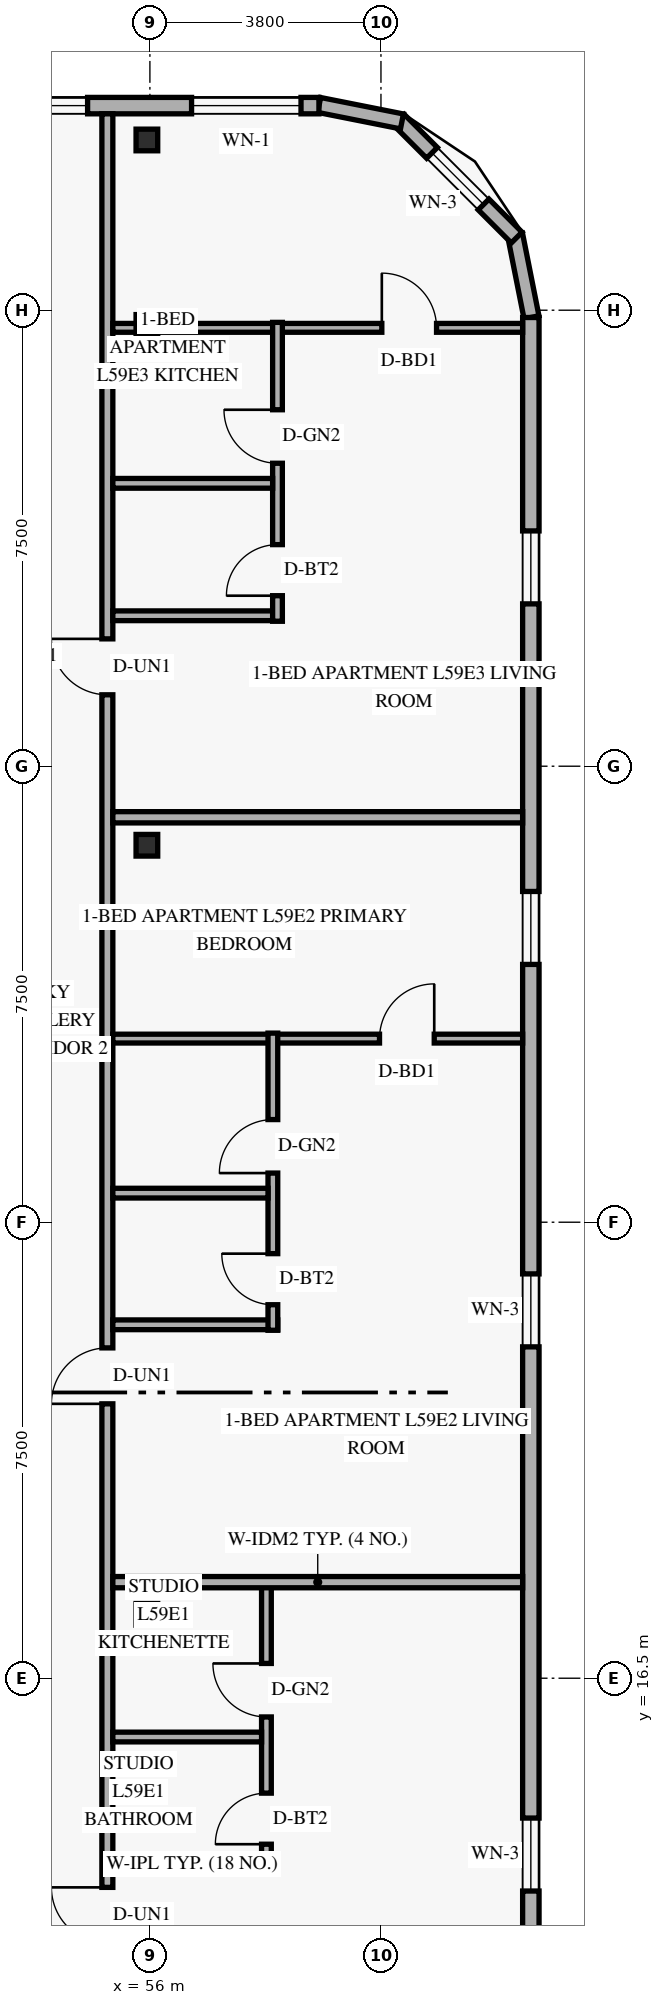
"""IFC4 building model, lengths in metres.
Left out: names, types, materials, properties, quantities, classifications, styles, units other than length and angle.
Written with IfcOpenShell. Run it as: python <this file> out.ifc"""

import sys

from ifc_helpers import new_model, si_unit, direction, frame, frame_2d, origin, origin_2d, place, context, subcontext, project, spatial, rectangle, hollow_rectangle, extrude, element, fill, save


model = new_model("IFC4")
c1 = context("Model", 3, precision=1e-05, world=origin(), true_north=direction((0.0, 1.0)))
c2 = subcontext(c1, "Body", "Model", "MODEL_VIEW")
j1 = project(units=[si_unit("LENGTHUNIT", "METRE"), si_unit("PLANEANGLEUNIT", "RADIAN")], contexts=[c1])
p1 = place(None, origin())
s1 = spatial("IfcSite", under=j1, at=p1, CompositionType="ELEMENT")
p2 = place(p1, origin())
s2 = spatial("IfcBuilding", under=s1, at=p2, CompositionType="ELEMENT")
p3 = place(p2, frame((0.0, 0.0, 227.4)))
s3 = spatial("IfcBuildingStorey", under=s2, at=p3, CompositionType="ELEMENT", Elevation=227.4)
for number, where, z_axis, x_axis in (
    (1, (55.846, 17.55, 0.0), (0.058, 0.0, 0.998), (0.0, 1.0, 0.0)),
    (2, (55.846, 30.2, 0.0), (0.058, 0.0, 0.998), (0.0, 1.0, 0.0)),
    (3, (55.846, 38.75, 0.0), (0.058, 0.0, 0.998), (0.0, 1.0, 0.0)),
    (4, (55.846, 41.8, 0.0), (0.058, 0.0, 0.998), (0.0, 1.0, 0.0)),
):
    element("IfcColumn", number, at=place(p3, frame(where, z_axis=z_axis, x_axis=x_axis)), inside=s3, PredefinedType="COLUMN", context=c2, shape_type="SweptSolid", body=[
        extrude(hollow_rectangle(XDim=0.356, YDim=0.356, WallThickness=0.016, at=origin_2d()), origin(), (0.0, 0.0, 1.0), 3.606),
    ])
p4 = place(p3, frame((62.276, 38.884, 0.0), z_axis=(0.0, 0.0, 1.0), x_axis=(-0.195135625965, 0.9807762678, 0.0)))
e5 = element("IfcWall", 5, at=p4, inside=s3, PredefinedType="SOLIDWALL", context=c2, shape_type="SweptSolid", body=[
    extrude(rectangle(XDim=1.389, YDim=0.25, at=frame_2d((0.694, 0.0))), origin(), (0.0, 0.0, 1.0), 3.35),
])
p5 = place(p3, frame((62.032, 40.195, 0.0), z_axis=(0.0, 0.0, 1.0), x_axis=(-0.707106781187, 0.707106781187, 0.0)))
e6 = element("IfcWall", 6, at=p5, inside=s3, PredefinedType="SOLIDWALL", context=c2, shape_type="SweptSolid", body=[
    extrude(rectangle(XDim=2.739, YDim=0.25, at=frame_2d((1.37, 0.0))), origin(), (0.0, 0.0, 1.0), 3.35),
])
p6 = place(p5, frame((0.77, 0.0, 0.85)))
e7 = element("IfcOpeningElement", 7, at=p6, cuts=e6, PredefinedType="OPENING", context=c2, shape_type="SweptSolid", body=[
    extrude(rectangle(XDim=1.2, YDim=1.5, at=frame_2d((0.6, 0.75))), frame((0.0, 0.135, 0.0), z_axis=(0.0, -1.0, 0.0), x_axis=(1.0, 0.0, 0.0)), (0.0, 0.0, 1.0), 0.27),
])
p7 = place(p3, frame((60.146, 42.105, 0.0), z_axis=(0.0, 0.0, 1.0), x_axis=(-0.980809899341, 0.19496651342, 0.0)))
e8 = element("IfcWall", 8, at=p7, inside=s3, PredefinedType="SOLIDWALL", context=c2, shape_type="SweptSolid", body=[
    extrude(rectangle(XDim=1.389, YDim=0.25, at=frame_2d((0.694, 0.0))), origin(), (0.0, 0.0, 1.0), 3.35),
])
p8 = place(p3, frame((62.265, 9.12, 0.0), z_axis=(0.0, 0.0, 1.0), x_axis=(0.0, 1.0, 0.0)))
e9 = element("IfcWall", 9, at=p8, inside=s3, PredefinedType="SOLIDWALL", context=c2, shape_type="SweptSolid", body=[
    extrude(rectangle(XDim=29.76, YDim=0.27, at=frame_2d((14.88, 0.0))), origin(), (0.0, 0.0, 1.0), 3.35),
])
p9 = place(p8, frame((3.88, 0.0, 0.85)))
e10 = element("IfcOpeningElement", 10, at=p9, cuts=e9, PredefinedType="OPENING", context=c2, shape_type="SweptSolid", body=[
    extrude(rectangle(XDim=1.2, YDim=1.5, at=frame_2d((0.6, 0.75))), frame((0.0, 0.145, 0.0), z_axis=(0.0, -1.0, 0.0), x_axis=(1.0, 0.0, 0.0)), (0.0, 0.0, 1.0), 0.29),
])
p10 = place(p8, frame((12.83, 0.0, 0.85)))
e11 = element("IfcOpeningElement", 11, at=p10, cuts=e9, PredefinedType="OPENING", context=c2, shape_type="SweptSolid", body=[
    extrude(rectangle(XDim=1.2, YDim=1.5, at=frame_2d((0.6, 0.75))), frame((0.0, 0.145, 0.0), z_axis=(0.0, -1.0, 0.0), x_axis=(1.0, 0.0, 0.0)), (0.0, 0.0, 1.0), 0.29),
])
p11 = place(p8, frame((19.12, 0.0, 0.85)))
e12 = element("IfcOpeningElement", 12, at=p11, cuts=e9, PredefinedType="OPENING", context=c2, shape_type="SweptSolid", body=[
    extrude(rectangle(XDim=1.2, YDim=1.5, at=frame_2d((0.6, 0.75))), frame((0.0, 0.145, 0.0), z_axis=(0.0, -1.0, 0.0), x_axis=(1.0, 0.0, 0.0)), (0.0, 0.0, 1.0), 0.29),
])
p12 = place(p8, frame((25.05, 0.0, 0.85)))
e13 = element("IfcOpeningElement", 13, at=p12, cuts=e9, PredefinedType="OPENING", context=c2, shape_type="SweptSolid", body=[
    extrude(rectangle(XDim=1.2, YDim=1.5, at=frame_2d((0.6, 0.75))), frame((0.0, 0.145, 0.0), z_axis=(0.0, -1.0, 0.0), x_axis=(1.0, 0.0, 0.0)), (0.0, 0.0, 1.0), 0.29),
])
p13 = place(p3, frame((58.78, 42.365, 0.0), z_axis=(0.0, 0.0, 1.0), x_axis=(-1.0, 0.0, 0.0)))
e14 = element("IfcWall", 14, at=p13, inside=s3, PredefinedType="SOLIDWALL", context=c2, shape_type="SweptSolid", body=[
    extrude(rectangle(XDim=32.96, YDim=0.27, at=frame_2d((16.48, 0.0))), origin(), (0.0, 0.0, 1.0), 3.35),
])
p14 = place(p13, frame((27.59, 0.0, 0.85)))
e15 = element("IfcOpeningElement", 15, at=p14, cuts=e14, PredefinedType="OPENING", context=c2, shape_type="SweptSolid", body=[
    extrude(rectangle(XDim=1.8, YDim=1.6, at=frame_2d((0.9, 0.8))), frame((0.0, 0.145, 0.0), z_axis=(0.0, -1.0, 0.0), x_axis=(1.0, 0.0, 0.0)), (0.0, 0.0, 1.0), 0.29),
])
p15 = place(p13, frame((14.671, 0.0, 0.85)))
e16 = element("IfcOpeningElement", 16, at=p15, cuts=e14, PredefinedType="OPENING", context=c2, shape_type="SweptSolid", body=[
    extrude(rectangle(XDim=1.8, YDim=1.6, at=frame_2d((0.9, 0.8))), frame((0.0, 0.145, 0.0), z_axis=(0.0, -1.0, 0.0), x_axis=(1.0, 0.0, 0.0)), (0.0, 0.0, 1.0), 0.29),
])
p16 = place(p13, frame((3.805, 0.0, 0.85)))
e17 = element("IfcOpeningElement", 17, at=p16, cuts=e14, PredefinedType="OPENING", context=c2, shape_type="SweptSolid", body=[
    extrude(rectangle(XDim=1.2, YDim=1.5, at=frame_2d((0.6, 0.75))), frame((0.0, 0.145, 0.0), z_axis=(0.0, -1.0, 0.0), x_axis=(1.0, 0.0, 0.0)), (0.0, 0.0, 1.0), 0.29),
])
p17 = place(p13, frame((0.295, 0.0, 0.85)))
e18 = element("IfcOpeningElement", 18, at=p17, cuts=e14, PredefinedType="OPENING", context=c2, shape_type="SweptSolid", body=[
    extrude(rectangle(XDim=1.8, YDim=1.6, at=frame_2d((0.9, 0.8))), frame((0.0, 0.145, 0.0), z_axis=(0.0, -1.0, 0.0), x_axis=(1.0, 0.0, 0.0)), (0.0, 0.0, 1.0), 0.29),
])
p18 = place(p3, frame((55.3, 5.77, 0.0), z_axis=(0.0, 0.0, 1.0), x_axis=(0.0, 1.0, 0.0)))
e19 = element("IfcWall", 19, at=p18, inside=s3, PredefinedType="STANDARD", context=c2, shape_type="SweptSolid", body=[
    extrude(rectangle(XDim=36.46, YDim=0.18, at=frame_2d((18.23, 0.0))), origin(), (0.0, 0.0, 1.0), 2.793),
])
p19 = place(p18, frame((6.37, 0.0, 0.0)))
e20 = element("IfcOpeningElement", 20, at=p19, cuts=e19, PredefinedType="OPENING", context=c2, shape_type="SweptSolid", body=[
    extrude(rectangle(XDim=0.92, YDim=2.15, at=frame_2d((0.46, 1.075))), frame((0.0, 0.1, 0.0), z_axis=(0.0, -1.0, 0.0), x_axis=(1.0, 0.0, 0.0)), (0.0, 0.0, 1.0), 0.2),
])
p20 = place(p18, frame((15.243, 0.0, 0.0)))
e21 = element("IfcOpeningElement", 21, at=p20, cuts=e19, PredefinedType="OPENING", context=c2, shape_type="SweptSolid", body=[
    extrude(rectangle(XDim=0.92, YDim=2.15, at=frame_2d((0.46, 1.075))), frame((0.0, 0.1, 0.0), z_axis=(0.0, -1.0, 0.0), x_axis=(1.0, 0.0, 0.0)), (0.0, 0.0, 1.0), 0.2),
])
p21 = place(p18, frame((26.905, 0.0, 0.0)))
e22 = element("IfcOpeningElement", 22, at=p21, cuts=e19, PredefinedType="OPENING", context=c2, shape_type="SweptSolid", body=[
    extrude(rectangle(XDim=0.92, YDim=2.15, at=frame_2d((0.46, 1.075))), frame((0.0, 0.1, 0.0), z_axis=(0.0, -1.0, 0.0), x_axis=(1.0, 0.0, 0.0)), (0.0, 0.0, 1.0), 0.2),
])
p22 = place(p3, frame((55.39, 13.44, 0.0), z_axis=(0.0, 0.0, 1.0), x_axis=(1.0, 0.0, 0.0)))
e23 = element("IfcWall", 23, at=p22, inside=s3, PredefinedType="PLUMBINGWALL", context=c2, shape_type="SweptSolid", body=[
    extrude(rectangle(XDim=2.606, YDim=0.16, at=frame_2d((1.303, 0.0))), origin(), (0.0, 0.0, 1.0), 2.793),
])
p23 = place(p3, frame((57.917, 13.35, 0.0), z_axis=(0.0, 0.0, 1.0), x_axis=(0.0, 1.0, 0.0)))
e24 = element("IfcWall", 24, at=p23, inside=s3, PredefinedType="PLUMBINGWALL", context=c2, shape_type="SweptSolid", body=[
    extrude(rectangle(XDim=4.73, YDim=0.16, at=frame_2d((2.365, 0.0))), origin(), (0.0, 0.0, 1.0), 3.35),
])
p24 = place(p23, frame((0.42, 0.0, 0.0)))
e25 = element("IfcOpeningElement", 25, at=p24, cuts=e24, PredefinedType="OPENING", context=c2, shape_type="SweptSolid", body=[
    extrude(rectangle(XDim=0.84, YDim=2.12, at=frame_2d((0.42, 1.06))), frame((0.0, 0.09, 0.0), z_axis=(0.0, -1.0, 0.0), x_axis=(1.0, 0.0, 0.0)), (0.0, 0.0, 1.0), 0.18),
])
p25 = place(p23, frame((2.513, 0.0, 0.0)))
e26 = element("IfcOpeningElement", 26, at=p25, cuts=e24, PredefinedType="OPENING", context=c2, shape_type="SweptSolid", body=[
    extrude(rectangle(XDim=0.88, YDim=2.12, at=frame_2d((0.44, 1.06))), frame((0.0, 0.09, 0.0), z_axis=(0.0, -1.0, 0.0), x_axis=(1.0, 0.0, 0.0)), (0.0, 0.0, 1.0), 0.18),
])
p26 = place(p3, frame((55.39, 15.533, 0.0), z_axis=(0.0, 0.0, 1.0), x_axis=(1.0, 0.0, 0.0)))
e27 = element("IfcWall", 27, at=p26, inside=s3, PredefinedType="PLUMBINGWALL", context=c2, shape_type="SweptSolid", body=[
    extrude(rectangle(XDim=2.446, YDim=0.16, at=frame_2d((1.223, 0.0))), origin(), (0.0, 0.0, 1.0), 2.793),
])
p27 = place(p3, frame((55.39, 18.08, 0.0), z_axis=(0.0, 0.0, 1.0), x_axis=(1.0, 0.0, 0.0)))
e28 = element("IfcWall", 28, at=p27, inside=s3, PredefinedType="PARTITIONING", context=c2, shape_type="SweptSolid", body=[
    extrude(rectangle(XDim=6.74, YDim=0.185, at=frame_2d((3.37, 0.0))), origin(), (0.0, 0.0, 1.0), 2.793),
])
p28 = place(p3, frame((55.39, 27.02, 0.0), z_axis=(0.0, 0.0, 1.0), x_axis=(1.0, 0.0, 0.0)))
e29 = element("IfcWall", 29, at=p28, inside=s3, PredefinedType="PARTITIONING", context=c2, shape_type="SweptSolid", body=[
    extrude(rectangle(XDim=6.74, YDim=0.145, at=frame_2d((3.37, 0.0))), origin(), (0.0, 0.0, 1.0), 2.793),
])
p29 = place(p28, frame((4.386, 0.0, 0.0)))
e30 = element("IfcOpeningElement", 30, at=p29, cuts=e29, PredefinedType="OPENING", context=c2, shape_type="SweptSolid", body=[
    extrude(rectangle(XDim=0.9, YDim=2.14, at=frame_2d((0.45, 1.07))), frame((0.0, 0.083, 0.0), z_axis=(0.0, -1.0, 0.0), x_axis=(1.0, 0.0, 0.0)), (0.0, 0.0, 1.0), 0.165),
])
p30 = place(p3, frame((55.39, 22.313, 0.0), z_axis=(0.0, 0.0, 1.0), x_axis=(1.0, 0.0, 0.0)))
e31 = element("IfcWall", 31, at=p30, inside=s3, PredefinedType="PLUMBINGWALL", context=c2, shape_type="SweptSolid", body=[
    extrude(rectangle(XDim=2.712, YDim=0.16, at=frame_2d((1.356, 0.0))), origin(), (0.0, 0.0, 1.0), 2.793),
])
p31 = place(p3, frame((58.022, 22.223, 0.0), z_axis=(0.0, 0.0, 1.0), x_axis=(0.0, 1.0, 0.0)))
e32 = element("IfcWall", 32, at=p31, inside=s3, PredefinedType="PLUMBINGWALL", context=c2, shape_type="SweptSolid", body=[
    extrude(rectangle(XDim=4.887, YDim=0.16, at=frame_2d((2.444, 0.0))), origin(), (0.0, 0.0, 1.0), 3.35),
])
p32 = place(p31, frame((0.42, 0.0, 0.0)))
e33 = element("IfcOpeningElement", 33, at=p32, cuts=e32, PredefinedType="OPENING", context=c2, shape_type="SweptSolid", body=[
    extrude(rectangle(XDim=0.84, YDim=2.12, at=frame_2d((0.42, 1.06))), frame((0.0, 0.09, 0.0), z_axis=(0.0, -1.0, 0.0), x_axis=(1.0, 0.0, 0.0)), (0.0, 0.0, 1.0), 0.18),
])
p33 = place(p31, frame((2.585, 0.0, 0.0)))
e34 = element("IfcOpeningElement", 34, at=p33, cuts=e32, PredefinedType="OPENING", context=c2, shape_type="SweptSolid", body=[
    extrude(rectangle(XDim=0.88, YDim=2.12, at=frame_2d((0.44, 1.06))), frame((0.0, 0.09, 0.0), z_axis=(0.0, -1.0, 0.0), x_axis=(1.0, 0.0, 0.0)), (0.0, 0.0, 1.0), 0.18),
])
p34 = place(p3, frame((55.39, 24.478, 0.0), z_axis=(0.0, 0.0, 1.0), x_axis=(1.0, 0.0, 0.0)))
e35 = element("IfcWall", 35, at=p34, inside=s3, PredefinedType="PLUMBINGWALL", context=c2, shape_type="SweptSolid", body=[
    extrude(rectangle(XDim=2.552, YDim=0.16, at=frame_2d((1.276, 0.0))), origin(), (0.0, 0.0, 1.0), 2.793),
])
p35 = place(p3, frame((55.39, 30.66, 0.0), z_axis=(0.0, 0.0, 1.0), x_axis=(1.0, 0.0, 0.0)))
e36 = element("IfcWall", 36, at=p35, inside=s3, PredefinedType="PARTITIONING", context=c2, shape_type="SweptSolid", body=[
    extrude(rectangle(XDim=6.74, YDim=0.185, at=frame_2d((3.37, 0.0))), origin(), (0.0, 0.0, 1.0), 2.793),
])
p36 = place(p3, frame((55.39, 38.71, 0.0), z_axis=(0.0, 0.0, 1.0), x_axis=(1.0, 0.0, 0.0)))
e37 = element("IfcWall", 37, at=p36, inside=s3, PredefinedType="PARTITIONING", context=c2, shape_type="SweptSolid", body=[
    extrude(rectangle(XDim=6.74, YDim=0.145, at=frame_2d((3.37, 0.0))), origin(), (0.0, 0.0, 1.0), 2.793),
])
p37 = place(p36, frame((4.424, 0.0, 0.0)))
e38 = element("IfcOpeningElement", 38, at=p37, cuts=e37, PredefinedType="OPENING", context=c2, shape_type="SweptSolid", body=[
    extrude(rectangle(XDim=0.9, YDim=2.14, at=frame_2d((0.45, 1.07))), frame((0.0, 0.083, 0.0), z_axis=(0.0, -1.0, 0.0), x_axis=(1.0, 0.0, 0.0)), (0.0, 0.0, 1.0), 0.165),
])
p38 = place(p3, frame((55.39, 33.975, 0.0), z_axis=(0.0, 0.0, 1.0), x_axis=(1.0, 0.0, 0.0)))
e39 = element("IfcWall", 39, at=p38, inside=s3, PredefinedType="PLUMBINGWALL", context=c2, shape_type="SweptSolid", body=[
    extrude(rectangle(XDim=2.788, YDim=0.16, at=frame_2d((1.394, 0.0))), origin(), (0.0, 0.0, 1.0), 2.793),
])
p39 = place(p3, frame((58.098, 33.885, 0.0), z_axis=(0.0, 0.0, 1.0), x_axis=(0.0, 1.0, 0.0)))
e40 = element("IfcWall", 40, at=p39, inside=s3, PredefinedType="PLUMBINGWALL", context=c2, shape_type="SweptSolid", body=[
    extrude(rectangle(XDim=4.916, YDim=0.16, at=frame_2d((2.458, 0.0))), origin(), (0.0, 0.0, 1.0), 3.35),
])
p40 = place(p39, frame((0.42, 0.0, 0.0)))
e41 = element("IfcOpeningElement", 41, at=p40, cuts=e40, PredefinedType="OPENING", context=c2, shape_type="SweptSolid", body=[
    extrude(rectangle(XDim=0.84, YDim=2.12, at=frame_2d((0.42, 1.06))), frame((0.0, 0.09, 0.0), z_axis=(0.0, -1.0, 0.0), x_axis=(1.0, 0.0, 0.0)), (0.0, 0.0, 1.0), 0.18),
])
p41 = place(p39, frame((2.598, 0.0, 0.0)))
e42 = element("IfcOpeningElement", 42, at=p41, cuts=e40, PredefinedType="OPENING", context=c2, shape_type="SweptSolid", body=[
    extrude(rectangle(XDim=0.88, YDim=2.12, at=frame_2d((0.44, 1.06))), frame((0.0, 0.09, 0.0), z_axis=(0.0, -1.0, 0.0), x_axis=(1.0, 0.0, 0.0)), (0.0, 0.0, 1.0), 0.18),
])
p42 = place(p3, frame((55.39, 36.153, 0.0), z_axis=(0.0, 0.0, 1.0), x_axis=(1.0, 0.0, 0.0)))
e43 = element("IfcWall", 43, at=p42, inside=s3, PredefinedType="PLUMBINGWALL", context=c2, shape_type="SweptSolid", body=[
    extrude(rectangle(XDim=2.628, YDim=0.16, at=frame_2d((1.314, 0.0))), origin(), (0.0, 0.0, 1.0), 2.793),
])
p43 = place(p6, origin())
e44 = element("IfcWindow", 44, at=p43, inside=s3, PartitioningType="SINGLE_PANEL", PredefinedType="WINDOW", context=c2, shape_type="SweptSolid", body=[
    extrude(rectangle(XDim=1.2, YDim=1.5, at=frame_2d((0.6, 0.75))), frame((0.0, 0.03, 0.0), z_axis=(0.0, -1.0, 0.0), x_axis=(1.0, 0.0, 0.0)), (0.0, 0.0, 1.0), 0.06),
])
fill(e7, e44)
p44 = place(p9, origin())
e45 = element("IfcWindow", 45, at=p44, inside=s3, PartitioningType="SINGLE_PANEL", PredefinedType="WINDOW", context=c2, shape_type="SweptSolid", body=[
    extrude(rectangle(XDim=1.2, YDim=1.5, at=frame_2d((0.6, 0.75))), frame((0.0, 0.03, 0.0), z_axis=(0.0, -1.0, 0.0), x_axis=(1.0, 0.0, 0.0)), (0.0, 0.0, 1.0), 0.06),
])
fill(e10, e45)
p45 = place(p10, origin())
e46 = element("IfcWindow", 46, at=p45, inside=s3, PartitioningType="SINGLE_PANEL", PredefinedType="WINDOW", context=c2, shape_type="SweptSolid", body=[
    extrude(rectangle(XDim=1.2, YDim=1.5, at=frame_2d((0.6, 0.75))), frame((0.0, 0.03, 0.0), z_axis=(0.0, -1.0, 0.0), x_axis=(1.0, 0.0, 0.0)), (0.0, 0.0, 1.0), 0.06),
])
fill(e11, e46)
p46 = place(p11, origin())
e47 = element("IfcWindow", 47, at=p46, inside=s3, PartitioningType="SINGLE_PANEL", PredefinedType="WINDOW", context=c2, shape_type="SweptSolid", body=[
    extrude(rectangle(XDim=1.2, YDim=1.5, at=frame_2d((0.6, 0.75))), frame((0.0, 0.03, 0.0), z_axis=(0.0, -1.0, 0.0), x_axis=(1.0, 0.0, 0.0)), (0.0, 0.0, 1.0), 0.06),
])
fill(e12, e47)
p47 = place(p12, origin())
e48 = element("IfcWindow", 48, at=p47, inside=s3, PartitioningType="SINGLE_PANEL", PredefinedType="WINDOW", context=c2, shape_type="SweptSolid", body=[
    extrude(rectangle(XDim=1.2, YDim=1.5, at=frame_2d((0.6, 0.75))), frame((0.0, 0.03, 0.0), z_axis=(0.0, -1.0, 0.0), x_axis=(1.0, 0.0, 0.0)), (0.0, 0.0, 1.0), 0.06),
])
fill(e13, e48)
p48 = place(p16, origin())
e49 = element("IfcWindow", 49, at=p48, inside=s3, PartitioningType="SINGLE_PANEL", PredefinedType="WINDOW", context=c2, shape_type="SweptSolid", body=[
    extrude(rectangle(XDim=1.2, YDim=1.5, at=frame_2d((0.6, 0.75))), frame((0.0, 0.03, 0.0), z_axis=(0.0, -1.0, 0.0), x_axis=(1.0, 0.0, 0.0)), (0.0, 0.0, 1.0), 0.06),
])
fill(e17, e49)
p49 = place(p17, origin())
e50 = element("IfcWindow", 50, at=p49, inside=s3, PartitioningType="SINGLE_PANEL", PredefinedType="WINDOW", context=c2, shape_type="SweptSolid", body=[
    extrude(rectangle(XDim=1.8, YDim=1.6, at=frame_2d((0.9, 0.8))), frame((0.0, 0.03, 0.0), z_axis=(0.0, -1.0, 0.0), x_axis=(1.0, 0.0, 0.0)), (0.0, 0.0, 1.0), 0.06),
])
fill(e18, e50)
p50 = place(p19, origin())
e51 = element("IfcDoor", 51, at=p50, inside=s3, OperationType="SINGLE_SWING_RIGHT", PredefinedType="DOOR", context=c2, shape_type="SweptSolid", body=[
    extrude(rectangle(XDim=0.92, YDim=2.15, at=frame_2d((0.46, 1.075))), frame((0.0, 0.025, 0.0), z_axis=(0.0, -1.0, 0.0), x_axis=(1.0, 0.0, 0.0)), (0.0, 0.0, 1.0), 0.05),
])
fill(e20, e51)
p51 = place(p24, origin())
e52 = element("IfcDoor", 52, at=p51, inside=s3, OperationType="SINGLE_SWING_LEFT", PredefinedType="DOOR", context=c2, shape_type="SweptSolid", body=[
    extrude(rectangle(XDim=0.84, YDim=2.12, at=frame_2d((0.42, 1.06))), frame((0.0, 0.025, 0.0), z_axis=(0.0, -1.0, 0.0), x_axis=(1.0, 0.0, 0.0)), (0.0, 0.0, 1.0), 0.05),
])
fill(e25, e52)
p52 = place(p25, origin())
e53 = element("IfcDoor", 53, at=p52, inside=s3, OperationType="SINGLE_SWING_RIGHT", PredefinedType="DOOR", context=c2, shape_type="SweptSolid", body=[
    extrude(rectangle(XDim=0.88, YDim=2.12, at=frame_2d((0.44, 1.06))), frame((0.0, 0.025, 0.0), z_axis=(0.0, -1.0, 0.0), x_axis=(1.0, 0.0, 0.0)), (0.0, 0.0, 1.0), 0.05),
])
fill(e26, e53)
p53 = place(p20, origin())
e54 = element("IfcDoor", 54, at=p53, inside=s3, OperationType="SINGLE_SWING_LEFT", PredefinedType="DOOR", context=c2, shape_type="SweptSolid", body=[
    extrude(rectangle(XDim=0.92, YDim=2.15, at=frame_2d((0.46, 1.075))), frame((0.0, 0.025, 0.0), z_axis=(0.0, -1.0, 0.0), x_axis=(1.0, 0.0, 0.0)), (0.0, 0.0, 1.0), 0.05),
])
fill(e21, e54)
p54 = place(p32, origin())
e55 = element("IfcDoor", 55, at=p54, inside=s3, OperationType="SINGLE_SWING_RIGHT", PredefinedType="DOOR", context=c2, shape_type="SweptSolid", body=[
    extrude(rectangle(XDim=0.84, YDim=2.12, at=frame_2d((0.42, 1.06))), frame((0.0, 0.025, 0.0), z_axis=(0.0, -1.0, 0.0), x_axis=(1.0, 0.0, 0.0)), (0.0, 0.0, 1.0), 0.05),
])
fill(e33, e55)
p55 = place(p33, origin())
e56 = element("IfcDoor", 56, at=p55, inside=s3, OperationType="SINGLE_SWING_LEFT", PredefinedType="DOOR", context=c2, shape_type="SweptSolid", body=[
    extrude(rectangle(XDim=0.88, YDim=2.12, at=frame_2d((0.44, 1.06))), frame((0.0, 0.025, 0.0), z_axis=(0.0, -1.0, 0.0), x_axis=(1.0, 0.0, 0.0)), (0.0, 0.0, 1.0), 0.05),
])
fill(e34, e56)
p56 = place(p29, origin())
e57 = element("IfcDoor", 57, at=p56, inside=s3, OperationType="SINGLE_SWING_RIGHT", PredefinedType="DOOR", context=c2, shape_type="SweptSolid", body=[
    extrude(rectangle(XDim=0.9, YDim=2.14, at=frame_2d((0.45, 1.07))), frame((0.0, 0.025, 0.0), z_axis=(0.0, -1.0, 0.0), x_axis=(1.0, 0.0, 0.0)), (0.0, 0.0, 1.0), 0.05),
])
fill(e30, e57)
p57 = place(p21, origin())
e58 = element("IfcDoor", 58, at=p57, inside=s3, OperationType="SINGLE_SWING_RIGHT", PredefinedType="DOOR", context=c2, shape_type="SweptSolid", body=[
    extrude(rectangle(XDim=0.92, YDim=2.15, at=frame_2d((0.46, 1.075))), frame((0.0, 0.025, 0.0), z_axis=(0.0, -1.0, 0.0), x_axis=(1.0, 0.0, 0.0)), (0.0, 0.0, 1.0), 0.05),
])
fill(e22, e58)
p58 = place(p40, origin())
e59 = element("IfcDoor", 59, at=p58, inside=s3, OperationType="SINGLE_SWING_LEFT", PredefinedType="DOOR", context=c2, shape_type="SweptSolid", body=[
    extrude(rectangle(XDim=0.84, YDim=2.12, at=frame_2d((0.42, 1.06))), frame((0.0, 0.025, 0.0), z_axis=(0.0, -1.0, 0.0), x_axis=(1.0, 0.0, 0.0)), (0.0, 0.0, 1.0), 0.05),
])
fill(e41, e59)
p59 = place(p41, origin())
e60 = element("IfcDoor", 60, at=p59, inside=s3, OperationType="SINGLE_SWING_RIGHT", PredefinedType="DOOR", context=c2, shape_type="SweptSolid", body=[
    extrude(rectangle(XDim=0.88, YDim=2.12, at=frame_2d((0.44, 1.06))), frame((0.0, 0.025, 0.0), z_axis=(0.0, -1.0, 0.0), x_axis=(1.0, 0.0, 0.0)), (0.0, 0.0, 1.0), 0.05),
])
fill(e42, e60)
p60 = place(p37, origin())
e61 = element("IfcDoor", 61, at=p60, inside=s3, OperationType="SINGLE_SWING_LEFT", PredefinedType="DOOR", context=c2, shape_type="SweptSolid", body=[
    extrude(rectangle(XDim=0.9, YDim=2.14, at=frame_2d((0.45, 1.07))), frame((0.0, 0.025, 0.0), z_axis=(0.0, -1.0, 0.0), x_axis=(1.0, 0.0, 0.0)), (0.0, 0.0, 1.0), 0.05),
])
fill(e38, e61)
save(model, sys.argv[1])
